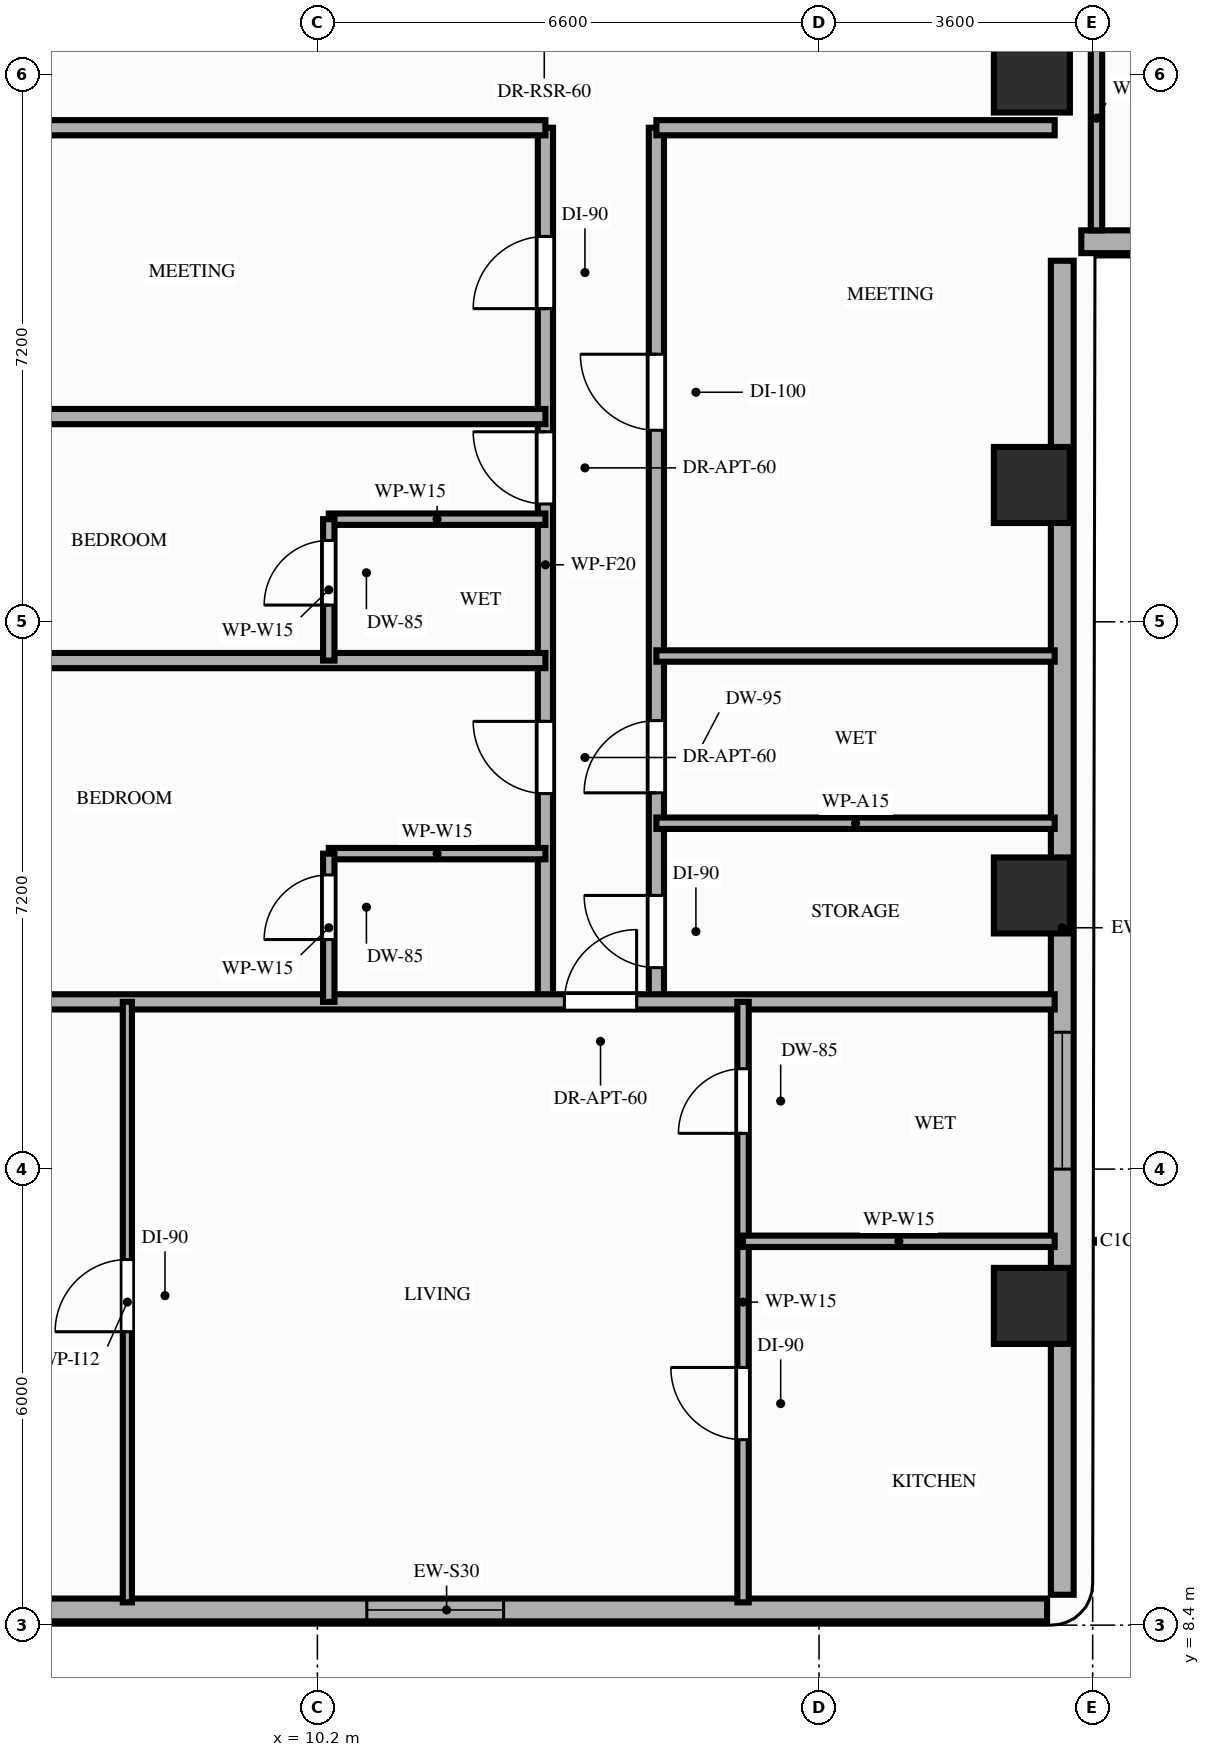
"""IFC4 building model, lengths in metres.
Left out: names, types, materials, properties, quantities, classifications, styles, units other than length and angle.
Written with IfcOpenShell. Run it as: python <this file> out.ifc"""

import sys

from ifc_helpers import new_model, si_unit, direction, frame, frame_2d, origin, origin_2d, place, context, subcontext, project, spatial, rectangle, extrude, element, fill, save


model = new_model("IFC4")
c1 = context("Model", 3, precision=1e-05, world=origin(), true_north=direction((0.0, 1.0)))
c2 = subcontext(c1, "Body", "Model", "MODEL_VIEW")
j1 = project(units=[si_unit("LENGTHUNIT", "METRE"), si_unit("PLANEANGLEUNIT", "RADIAN")], contexts=[c1])
p1 = place(None, origin())
s1 = spatial("IfcSite", under=j1, at=p1, CompositionType="ELEMENT")
p2 = place(p1, origin())
s2 = spatial("IfcBuilding", under=s1, at=p2, CompositionType="ELEMENT")
p3 = place(p2, frame((0.0, 0.0, 149.0)))
s3 = spatial("IfcBuildingStorey", under=s2, at=p3, CompositionType="ELEMENT", Elevation=149.0)
for number, where, z_axis, x_axis in (
    (1, (19.6, 12.6, 0.0), (0.0, 0.0, 1.0), (1.0, 0.0, 0.0)),
    (2, (19.6, 18.0, 0.0), (0.0, 0.0, 1.0), (1.0, 0.0, 0.0)),
    (3, (19.6, 23.4, 0.0), (0.0, 0.0, 1.0), (1.0, 0.0, 0.0)),
    (4, (19.6, 28.8, 0.0), (0.0, 0.0, 1.0), (1.0, 0.0, 0.0)),
):
    element("IfcColumn", number, at=place(p3, frame(where, z_axis=z_axis, x_axis=x_axis)), inside=s3, PredefinedType="COLUMN", context=c2, shape_type="SweptSolid", body=[
        extrude(rectangle(XDim=1.0, YDim=1.0, at=origin_2d()), origin(), (0.0, 0.0, 1.0), 3.2),
    ])
p4 = place(p3, frame((4.0, 8.6, 0.0), z_axis=(0.0, 0.0, 1.0), x_axis=(1.0, 0.0, 0.0)))
e5 = element("IfcWall", 5, at=p4, inside=s3, PredefinedType="STANDARD", context=c2, shape_type="SweptSolid", body=[
    extrude(rectangle(XDim=15.8, YDim=0.3, at=frame_2d((7.9, 0.0))), origin(), (0.0, 0.0, 1.0), 2.96),
])
p5 = place(p4, frame((6.85, 0.0, 0.85)))
e6 = element("IfcOpeningElement", 6, at=p5, cuts=e5, PredefinedType="OPENING", context=c2, shape_type="SweptSolid", body=[
    extrude(rectangle(XDim=1.8, YDim=1.75, at=frame_2d((0.9, 0.875))), frame((0.0, 0.16, 0.0), z_axis=(0.0, -1.0, 0.0), x_axis=(1.0, 0.0, 0.0)), (0.0, 0.0, 1.0), 0.32),
])
p6 = place(p3, frame((20.0, 8.8, 0.0), z_axis=(0.0, 0.0, 1.0), x_axis=(0.0, 1.0, 0.0)))
e7 = element("IfcWall", 7, at=p6, inside=s3, PredefinedType="STANDARD", context=c2, shape_type="SweptSolid", body=[
    extrude(rectangle(XDim=17.55, YDim=0.3, at=frame_2d((8.775, 0.0))), origin(), (0.0, 0.0, 1.0), 2.4),
])
p7 = place(p6, frame((5.6, 0.0, 0.85)))
e8 = element("IfcOpeningElement", 8, at=p7, cuts=e7, PredefinedType="OPENING", context=c2, shape_type="SweptSolid", body=[
    extrude(rectangle(XDim=1.8, YDim=1.3, at=frame_2d((0.9, 0.65))), frame((0.0, 0.16, 0.0), z_axis=(0.0, -1.0, 0.0), x_axis=(1.0, 0.0, 0.0)), (0.0, 0.0, 1.0), 0.32),
])
p8 = place(p3, frame((20.25, 26.6, 0.0), z_axis=(0.0, 0.0, 1.0), x_axis=(1.0, 0.0, 0.0)))
e9 = element("IfcWall", 9, at=p8, inside=s3, PredefinedType="STANDARD", context=c2, shape_type="SweptSolid", body=[
    extrude(rectangle(XDim=26.15, YDim=0.3, at=frame_2d((13.075, 0.0))), origin(), (0.0, 0.0, 1.0), 2.67),
])
p9 = place(p8, frame((8.0, 0.0, 0.0)))
e10 = element("IfcOpeningElement", 10, at=p9, cuts=e9, PredefinedType="OPENING", context=c2, shape_type="SweptSolid", body=[
    extrude(rectangle(XDim=1.3, YDim=2.08, at=frame_2d((0.65, 1.04))), frame((0.0, 0.16, 0.0), z_axis=(0.0, -1.0, 0.0), x_axis=(1.0, 0.0, 0.0)), (0.0, 0.0, 1.0), 0.32),
])
p10 = place(p8, frame((22.5, 0.0, 0.0)))
e11 = element("IfcOpeningElement", 11, at=p10, cuts=e9, PredefinedType="OPENING", context=c2, shape_type="SweptSolid", body=[
    extrude(rectangle(XDim=1.3, YDim=2.08, at=frame_2d((0.65, 1.04))), frame((0.0, 0.16, 0.0), z_axis=(0.0, -1.0, 0.0), x_axis=(1.0, 0.0, 0.0)), (0.0, 0.0, 1.0), 0.32),
])
p11 = place(p8, frame((2.25, 0.0, 0.85)))
e12 = element("IfcOpeningElement", 12, at=p11, cuts=e9, PredefinedType="OPENING", context=c2, shape_type="SweptSolid", body=[
    extrude(rectangle(XDim=1.8, YDim=1.57, at=frame_2d((0.9, 0.785))), frame((0.0, 0.16, 0.0), z_axis=(0.0, -1.0, 0.0), x_axis=(1.0, 0.0, 0.0)), (0.0, 0.0, 1.0), 0.32),
])
p12 = place(p8, frame((13.65, 0.0, 0.85)))
e13 = element("IfcOpeningElement", 13, at=p12, cuts=e9, PredefinedType="OPENING", context=c2, shape_type="SweptSolid", body=[
    extrude(rectangle(XDim=1.8, YDim=1.57, at=frame_2d((0.9, 0.785))), frame((0.0, 0.16, 0.0), z_axis=(0.0, -1.0, 0.0), x_axis=(1.0, 0.0, 0.0)), (0.0, 0.0, 1.0), 0.32),
])
p13 = place(p3, frame((13.2, 16.6, 0.0), z_axis=(0.0, 0.0, 1.0), x_axis=(0.0, 1.0, 0.0)))
e14 = element("IfcWall", 14, at=p13, inside=s3, PredefinedType="PARTITIONING", context=c2, shape_type="SweptSolid", body=[
    extrude(rectangle(XDim=11.5, YDim=0.2, at=frame_2d((5.75, 0.0))), origin(), (0.0, 0.0, 1.0), 2.4),
])
p14 = place(p13, frame((2.74, 0.0, 0.0)))
e15 = element("IfcOpeningElement", 15, at=p14, cuts=e14, PredefinedType="OPENING", context=c2, shape_type="SweptSolid", body=[
    extrude(rectangle(XDim=0.95, YDim=2.15, at=frame_2d((0.475, 1.075))), frame((0.0, 0.11, 0.0), z_axis=(0.0, -1.0, 0.0), x_axis=(1.0, 0.0, 0.0)), (0.0, 0.0, 1.0), 0.22),
])
p15 = place(p13, frame((6.55, 0.0, 0.0)))
e16 = element("IfcOpeningElement", 16, at=p15, cuts=e14, PredefinedType="OPENING", context=c2, shape_type="SweptSolid", body=[
    extrude(rectangle(XDim=0.95, YDim=2.15, at=frame_2d((0.475, 1.075))), frame((0.0, 0.11, 0.0), z_axis=(0.0, -1.0, 0.0), x_axis=(1.0, 0.0, 0.0)), (0.0, 0.0, 1.0), 0.22),
])
p16 = place(p13, frame((9.12, 0.0, 0.0)))
e17 = element("IfcOpeningElement", 17, at=p16, cuts=e14, PredefinedType="OPENING", context=c2, shape_type="SweptSolid", body=[
    extrude(rectangle(XDim=0.95, YDim=2.15, at=frame_2d((0.475, 1.075))), frame((0.0, 0.11, 0.0), z_axis=(0.0, -1.0, 0.0), x_axis=(1.0, 0.0, 0.0)), (0.0, 0.0, 1.0), 0.22),
])
p17 = place(p3, frame((14.66, 16.6, 0.0), z_axis=(0.0, 0.0, 1.0), x_axis=(0.0, 1.0, 0.0)))
e18 = element("IfcWall", 18, at=p17, inside=s3, PredefinedType="PARTITIONING", context=c2, shape_type="SweptSolid", body=[
    extrude(rectangle(XDim=11.5, YDim=0.2, at=frame_2d((5.75, 0.0))), origin(), (0.0, 0.0, 1.0), 2.4),
])
p18 = place(p17, frame((0.45, 0.0, 0.0)))
e19 = element("IfcOpeningElement", 19, at=p18, cuts=e18, PredefinedType="OPENING", context=c2, shape_type="SweptSolid", body=[
    extrude(rectangle(XDim=0.95, YDim=2.15, at=frame_2d((0.475, 1.075))), frame((0.0, 0.11, 0.0), z_axis=(0.0, -1.0, 0.0), x_axis=(1.0, 0.0, 0.0)), (0.0, 0.0, 1.0), 0.22),
])
p19 = place(p17, frame((2.75, 0.0, 0.0)))
e20 = element("IfcOpeningElement", 20, at=p19, cuts=e18, PredefinedType="OPENING", context=c2, shape_type="SweptSolid", body=[
    extrude(rectangle(XDim=0.95, YDim=2.1, at=frame_2d((0.475, 1.05))), frame((0.0, 0.11, 0.0), z_axis=(0.0, -1.0, 0.0), x_axis=(1.0, 0.0, 0.0)), (0.0, 0.0, 1.0), 0.22),
])
p20 = place(p17, frame((7.52, 0.0, 0.0)))
e21 = element("IfcOpeningElement", 21, at=p20, cuts=e18, PredefinedType="OPENING", context=c2, shape_type="SweptSolid", body=[
    extrude(rectangle(XDim=1.0, YDim=2.15, at=frame_2d((0.5, 1.075))), frame((0.0, 0.11, 0.0), z_axis=(0.0, -1.0, 0.0), x_axis=(1.0, 0.0, 0.0)), (0.0, 0.0, 1.0), 0.22),
])
p21 = place(p3, frame((3.9, 16.6, 0.0), z_axis=(0.0, 0.0, 1.0), x_axis=(1.0, 0.0, 0.0)))
e22 = element("IfcWall", 22, at=p21, inside=s3, PredefinedType="PARTITIONING", context=c2, shape_type="SweptSolid", body=[
    extrude(rectangle(XDim=16.0, YDim=0.2, at=frame_2d((8.0, 0.0))), origin(), (0.0, 0.0, 1.0), 2.4),
])
p22 = place(p21, frame((9.55, 0.0, 0.0)))
e23 = element("IfcOpeningElement", 23, at=p22, cuts=e22, PredefinedType="OPENING", context=c2, shape_type="SweptSolid", body=[
    extrude(rectangle(XDim=0.95, YDim=2.15, at=frame_2d((0.475, 1.075))), frame((0.0, 0.11, 0.0), z_axis=(0.0, -1.0, 0.0), x_axis=(1.0, 0.0, 0.0)), (0.0, 0.0, 1.0), 0.22),
])
p23 = place(p3, frame((3.9, 28.1, 0.0), z_axis=(0.0, 0.0, 1.0), x_axis=(1.0, 0.0, 0.0)))
e24 = element("IfcWall", 24, at=p23, inside=s3, PredefinedType="PARTITIONING", context=c2, shape_type="SweptSolid", body=[
    extrude(rectangle(XDim=9.3, YDim=0.2, at=frame_2d((4.65, 0.0))), origin(), (0.0, 0.0, 1.0), 2.4),
])
p24 = place(p3, frame((14.66, 28.1, 0.0), z_axis=(0.0, 0.0, 1.0), x_axis=(1.0, 0.0, 0.0)))
e25 = element("IfcWall", 25, at=p24, inside=s3, PredefinedType="PARTITIONING", context=c2, shape_type="SweptSolid", body=[
    extrude(rectangle(XDim=5.24, YDim=0.2, at=frame_2d((2.62, 0.0))), origin(), (0.0, 0.0, 1.0), 2.4),
])
p25 = place(p3, frame((20.45, 26.75, 0.0), z_axis=(0.0, 0.0, 1.0), x_axis=(0.0, 1.0, 0.0)))
e26 = element("IfcWall", 26, at=p25, inside=s3, PredefinedType="PARTITIONING", context=c2, shape_type="SweptSolid", body=[
    extrude(rectangle(XDim=2.95, YDim=0.15, at=frame_2d((1.475, 0.0))), origin(), (0.0, 0.0, 1.0), 2.4),
])
p26 = place(p3, frame((10.35, 18.55, 0.0), z_axis=(0.0, 0.0, 1.0), x_axis=(1.0, 0.0, 0.0)))
e27 = element("IfcWall", 27, at=p26, inside=s3, PredefinedType="PARTITIONING", context=c2, shape_type="SweptSolid", body=[
    extrude(rectangle(XDim=2.85, YDim=0.15, at=frame_2d((1.425, 0.0))), origin(), (0.0, 0.0, 1.0), 2.96),
])
p27 = place(p3, frame((10.35, 16.6, 0.0), z_axis=(0.0, 0.0, 1.0), x_axis=(0.0, 1.0, 0.0)))
e28 = element("IfcWall", 28, at=p27, inside=s3, PredefinedType="PARTITIONING", context=c2, shape_type="SweptSolid", body=[
    extrude(rectangle(XDim=1.95, YDim=0.15, at=frame_2d((0.975, 0.0))), origin(), (0.0, 0.0, 1.0), 2.4),
])
p28 = place(p27, frame((0.82, 0.0, 0.0)))
e29 = element("IfcOpeningElement", 29, at=p28, cuts=e28, PredefinedType="OPENING", context=c2, shape_type="SweptSolid", body=[
    extrude(rectangle(XDim=0.85, YDim=2.1, at=frame_2d((0.425, 1.05))), frame((0.0, 0.085, 0.0), z_axis=(0.0, -1.0, 0.0), x_axis=(1.0, 0.0, 0.0)), (0.0, 0.0, 1.0), 0.17),
])
p29 = place(p3, frame((3.9, 21.09, 0.0), z_axis=(0.0, 0.0, 1.0), x_axis=(1.0, 0.0, 0.0)))
e30 = element("IfcWall", 30, at=p29, inside=s3, PredefinedType="PARTITIONING", context=c2, shape_type="SweptSolid", body=[
    extrude(rectangle(XDim=9.3, YDim=0.2, at=frame_2d((4.65, 0.0))), origin(), (0.0, 0.0, 1.0), 2.4),
])
p30 = place(p3, frame((10.35, 22.95, 0.0), z_axis=(0.0, 0.0, 1.0), x_axis=(1.0, 0.0, 0.0)))
e31 = element("IfcWall", 31, at=p30, inside=s3, PredefinedType="PARTITIONING", context=c2, shape_type="SweptSolid", body=[
    extrude(rectangle(XDim=2.85, YDim=0.15, at=frame_2d((1.425, 0.0))), origin(), (0.0, 0.0, 1.0), 2.96),
])
p31 = place(p3, frame((10.35, 21.09, 0.0), z_axis=(0.0, 0.0, 1.0), x_axis=(0.0, 1.0, 0.0)))
e32 = element("IfcWall", 32, at=p31, inside=s3, PredefinedType="PARTITIONING", context=c2, shape_type="SweptSolid", body=[
    extrude(rectangle(XDim=1.86, YDim=0.15, at=frame_2d((0.93, 0.0))), origin(), (0.0, 0.0, 1.0), 2.55),
])
p32 = place(p31, frame((0.73, 0.0, 0.0)))
e33 = element("IfcOpeningElement", 33, at=p32, cuts=e32, PredefinedType="OPENING", context=c2, shape_type="SweptSolid", body=[
    extrude(rectangle(XDim=0.85, YDim=2.1, at=frame_2d((0.425, 1.05))), frame((0.0, 0.085, 0.0), z_axis=(0.0, -1.0, 0.0), x_axis=(1.0, 0.0, 0.0)), (0.0, 0.0, 1.0), 0.17),
])
p33 = place(p3, frame((3.9, 24.3, 0.0), z_axis=(0.0, 0.0, 1.0), x_axis=(1.0, 0.0, 0.0)))
e34 = element("IfcWall", 34, at=p33, inside=s3, PredefinedType="PARTITIONING", context=c2, shape_type="SweptSolid", body=[
    extrude(rectangle(XDim=9.3, YDim=0.2, at=frame_2d((4.65, 0.0))), origin(), (0.0, 0.0, 1.0), 2.4),
])
p34 = place(p3, frame((7.7, 8.7, 0.0), z_axis=(0.0, 0.0, 1.0), x_axis=(0.0, 1.0, 0.0)))
e35 = element("IfcWall", 35, at=p34, inside=s3, PredefinedType="PARTITIONING", context=c2, shape_type="SweptSolid", body=[
    extrude(rectangle(XDim=7.9, YDim=0.12, at=frame_2d((3.95, 0.0))), origin(), (0.0, 0.0, 1.0), 2.4),
])
p35 = place(p34, frame((3.56, 0.0, 0.0)))
e36 = element("IfcOpeningElement", 36, at=p35, cuts=e35, PredefinedType="OPENING", context=c2, shape_type="SweptSolid", body=[
    extrude(rectangle(XDim=0.95, YDim=2.15, at=frame_2d((0.475, 1.075))), frame((0.0, 0.07, 0.0), z_axis=(0.0, -1.0, 0.0), x_axis=(1.0, 0.0, 0.0)), (0.0, 0.0, 1.0), 0.14),
])
p36 = place(p3, frame((15.8, 8.7, 0.0), z_axis=(0.0, 0.0, 1.0), x_axis=(0.0, 1.0, 0.0)))
e37 = element("IfcWall", 37, at=p36, inside=s3, PredefinedType="PARTITIONING", context=c2, shape_type="SweptSolid", body=[
    extrude(rectangle(XDim=7.9, YDim=0.15, at=frame_2d((3.95, 0.0))), origin(), (0.0, 0.0, 1.0), 2.4),
])
p37 = place(p36, frame((2.14, 0.0, 0.0)))
e38 = element("IfcOpeningElement", 38, at=p37, cuts=e37, PredefinedType="OPENING", context=c2, shape_type="SweptSolid", body=[
    extrude(rectangle(XDim=0.95, YDim=2.15, at=frame_2d((0.475, 1.075))), frame((0.0, 0.085, 0.0), z_axis=(0.0, -1.0, 0.0), x_axis=(1.0, 0.0, 0.0)), (0.0, 0.0, 1.0), 0.17),
])
p38 = place(p36, frame((6.17, 0.0, 0.0)))
e39 = element("IfcOpeningElement", 39, at=p38, cuts=e37, PredefinedType="OPENING", context=c2, shape_type="SweptSolid", body=[
    extrude(rectangle(XDim=0.85, YDim=2.1, at=frame_2d((0.425, 1.05))), frame((0.0, 0.085, 0.0), z_axis=(0.0, -1.0, 0.0), x_axis=(1.0, 0.0, 0.0)), (0.0, 0.0, 1.0), 0.17),
])
p39 = place(p3, frame((15.8, 13.45, 0.0), z_axis=(0.0, 0.0, 1.0), x_axis=(1.0, 0.0, 0.0)))
e40 = element("IfcWall", 40, at=p39, inside=s3, PredefinedType="PARTITIONING", context=c2, shape_type="SweptSolid", body=[
    extrude(rectangle(XDim=4.1, YDim=0.15, at=frame_2d((2.05, 0.0))), origin(), (0.0, 0.0, 1.0), 2.4),
])
for number, where, z_axis, x_axis in (
    (41, (14.66, 18.95, 0.0), (0.0, 0.0, 1.0), (1.0, 0.0, 0.0)),
    (42, (14.66, 21.15, 0.0), (0.0, 0.0, 1.0), (1.0, 0.0, 0.0)),
):
    element("IfcWall", number, at=place(p3, frame(where, z_axis=z_axis, x_axis=x_axis)), inside=s3, PredefinedType="PARTITIONING", context=c2, shape_type="SweptSolid", body=[
        extrude(rectangle(XDim=5.24, YDim=0.15, at=frame_2d((2.62, 0.0))), origin(), (0.0, 0.0, 1.0), 2.4),
    ])
p40 = place(p5, origin())
e43 = element("IfcWindow", 43, at=p40, inside=s3, PartitioningType="SINGLE_PANEL", PredefinedType="WINDOW", context=c2, shape_type="SweptSolid", body=[
    extrude(rectangle(XDim=1.8, YDim=1.75, at=frame_2d((0.9, 0.875))), frame((0.0, 0.03, 0.0), z_axis=(0.0, -1.0, 0.0), x_axis=(1.0, 0.0, 0.0)), (0.0, 0.0, 1.0), 0.06),
])
fill(e6, e43)
p41 = place(p7, origin())
e44 = element("IfcWindow", 44, at=p41, inside=s3, PartitioningType="SINGLE_PANEL", PredefinedType="WINDOW", context=c2, shape_type="SweptSolid", body=[
    extrude(rectangle(XDim=1.8, YDim=1.3, at=frame_2d((0.9, 0.65))), frame((0.0, 0.03, 0.0), z_axis=(0.0, -1.0, 0.0), x_axis=(1.0, 0.0, 0.0)), (0.0, 0.0, 1.0), 0.06),
])
fill(e8, e44)
p42 = place(p28, origin())
e45 = element("IfcDoor", 45, at=p42, inside=s3, OperationType="SINGLE_SWING_LEFT", PredefinedType="DOOR", context=c2, shape_type="SweptSolid", body=[
    extrude(rectangle(XDim=0.85, YDim=2.1, at=frame_2d((0.425, 1.05))), frame((0.0, 0.025, 0.0), z_axis=(0.0, -1.0, 0.0), x_axis=(1.0, 0.0, 0.0)), (0.0, 0.0, 1.0), 0.05),
])
fill(e29, e45)
p43 = place(p14, origin())
e46 = element("IfcDoor", 46, at=p43, inside=s3, OperationType="SINGLE_SWING_RIGHT", PredefinedType="DOOR", context=c2, shape_type="SweptSolid", body=[
    extrude(rectangle(XDim=0.95, YDim=2.15, at=frame_2d((0.475, 1.075))), frame((0.0, 0.025, 0.0), z_axis=(0.0, -1.0, 0.0), x_axis=(1.0, 0.0, 0.0)), (0.0, 0.0, 1.0), 0.05),
])
fill(e15, e46)
p44 = place(p32, origin())
e47 = element("IfcDoor", 47, at=p44, inside=s3, OperationType="SINGLE_SWING_LEFT", PredefinedType="DOOR", context=c2, shape_type="SweptSolid", body=[
    extrude(rectangle(XDim=0.85, YDim=2.1, at=frame_2d((0.425, 1.05))), frame((0.0, 0.025, 0.0), z_axis=(0.0, -1.0, 0.0), x_axis=(1.0, 0.0, 0.0)), (0.0, 0.0, 1.0), 0.05),
])
fill(e33, e47)
p45 = place(p15, origin())
e48 = element("IfcDoor", 48, at=p45, inside=s3, OperationType="SINGLE_SWING_RIGHT", PredefinedType="DOOR", context=c2, shape_type="SweptSolid", body=[
    extrude(rectangle(XDim=0.95, YDim=2.15, at=frame_2d((0.475, 1.075))), frame((0.0, 0.025, 0.0), z_axis=(0.0, -1.0, 0.0), x_axis=(1.0, 0.0, 0.0)), (0.0, 0.0, 1.0), 0.05),
])
fill(e16, e48)
p46 = place(p16, origin())
e49 = element("IfcDoor", 49, at=p46, inside=s3, OperationType="SINGLE_SWING_LEFT", PredefinedType="DOOR", context=c2, shape_type="SweptSolid", body=[
    extrude(rectangle(XDim=0.95, YDim=2.15, at=frame_2d((0.475, 1.075))), frame((0.0, 0.025, 0.0), z_axis=(0.0, -1.0, 0.0), x_axis=(1.0, 0.0, 0.0)), (0.0, 0.0, 1.0), 0.05),
])
fill(e17, e49)
p47 = place(p22, origin())
e50 = element("IfcDoor", 50, at=p47, inside=s3, OperationType="SINGLE_SWING_RIGHT", PredefinedType="DOOR", context=c2, shape_type="SweptSolid", body=[
    extrude(rectangle(XDim=0.95, YDim=2.15, at=frame_2d((0.475, 1.075))), frame((0.0, 0.025, 0.0), z_axis=(0.0, -1.0, 0.0), x_axis=(1.0, 0.0, 0.0)), (0.0, 0.0, 1.0), 0.05),
])
fill(e23, e50)
p48 = place(p35, origin())
e51 = element("IfcDoor", 51, at=p48, inside=s3, OperationType="SINGLE_SWING_LEFT", PredefinedType="DOOR", context=c2, shape_type="SweptSolid", body=[
    extrude(rectangle(XDim=0.95, YDim=2.15, at=frame_2d((0.475, 1.075))), frame((0.0, 0.025, 0.0), z_axis=(0.0, -1.0, 0.0), x_axis=(1.0, 0.0, 0.0)), (0.0, 0.0, 1.0), 0.05),
])
fill(e36, e51)
p49 = place(p37, origin())
e52 = element("IfcDoor", 52, at=p49, inside=s3, OperationType="SINGLE_SWING_RIGHT", PredefinedType="DOOR", context=c2, shape_type="SweptSolid", body=[
    extrude(rectangle(XDim=0.95, YDim=2.15, at=frame_2d((0.475, 1.075))), frame((0.0, 0.025, 0.0), z_axis=(0.0, -1.0, 0.0), x_axis=(1.0, 0.0, 0.0)), (0.0, 0.0, 1.0), 0.05),
])
fill(e38, e52)
p50 = place(p38, origin())
e53 = element("IfcDoor", 53, at=p50, inside=s3, OperationType="SINGLE_SWING_LEFT", PredefinedType="DOOR", context=c2, shape_type="SweptSolid", body=[
    extrude(rectangle(XDim=0.85, YDim=2.1, at=frame_2d((0.425, 1.05))), frame((0.0, 0.025, 0.0), z_axis=(0.0, -1.0, 0.0), x_axis=(1.0, 0.0, 0.0)), (0.0, 0.0, 1.0), 0.05),
])
fill(e39, e53)
p51 = place(p18, origin())
e54 = element("IfcDoor", 54, at=p51, inside=s3, OperationType="SINGLE_SWING_RIGHT", PredefinedType="DOOR", context=c2, shape_type="SweptSolid", body=[
    extrude(rectangle(XDim=0.95, YDim=2.15, at=frame_2d((0.475, 1.075))), frame((0.0, 0.025, 0.0), z_axis=(0.0, -1.0, 0.0), x_axis=(1.0, 0.0, 0.0)), (0.0, 0.0, 1.0), 0.05),
])
fill(e19, e54)
p52 = place(p19, origin())
e55 = element("IfcDoor", 55, at=p52, inside=s3, OperationType="SINGLE_SWING_LEFT", PredefinedType="DOOR", context=c2, shape_type="SweptSolid", body=[
    extrude(rectangle(XDim=0.95, YDim=2.1, at=frame_2d((0.475, 1.05))), frame((0.0, 0.025, 0.0), z_axis=(0.0, -1.0, 0.0), x_axis=(1.0, 0.0, 0.0)), (0.0, 0.0, 1.0), 0.05),
])
fill(e20, e55)
p53 = place(p20, origin())
e56 = element("IfcDoor", 56, at=p53, inside=s3, OperationType="SINGLE_SWING_RIGHT", PredefinedType="DOOR", context=c2, shape_type="SweptSolid", body=[
    extrude(rectangle(XDim=1.0, YDim=2.15, at=frame_2d((0.5, 1.075))), frame((0.0, 0.025, 0.0), z_axis=(0.0, -1.0, 0.0), x_axis=(1.0, 0.0, 0.0)), (0.0, 0.0, 1.0), 0.05),
])
fill(e21, e56)
save(model, sys.argv[1])
